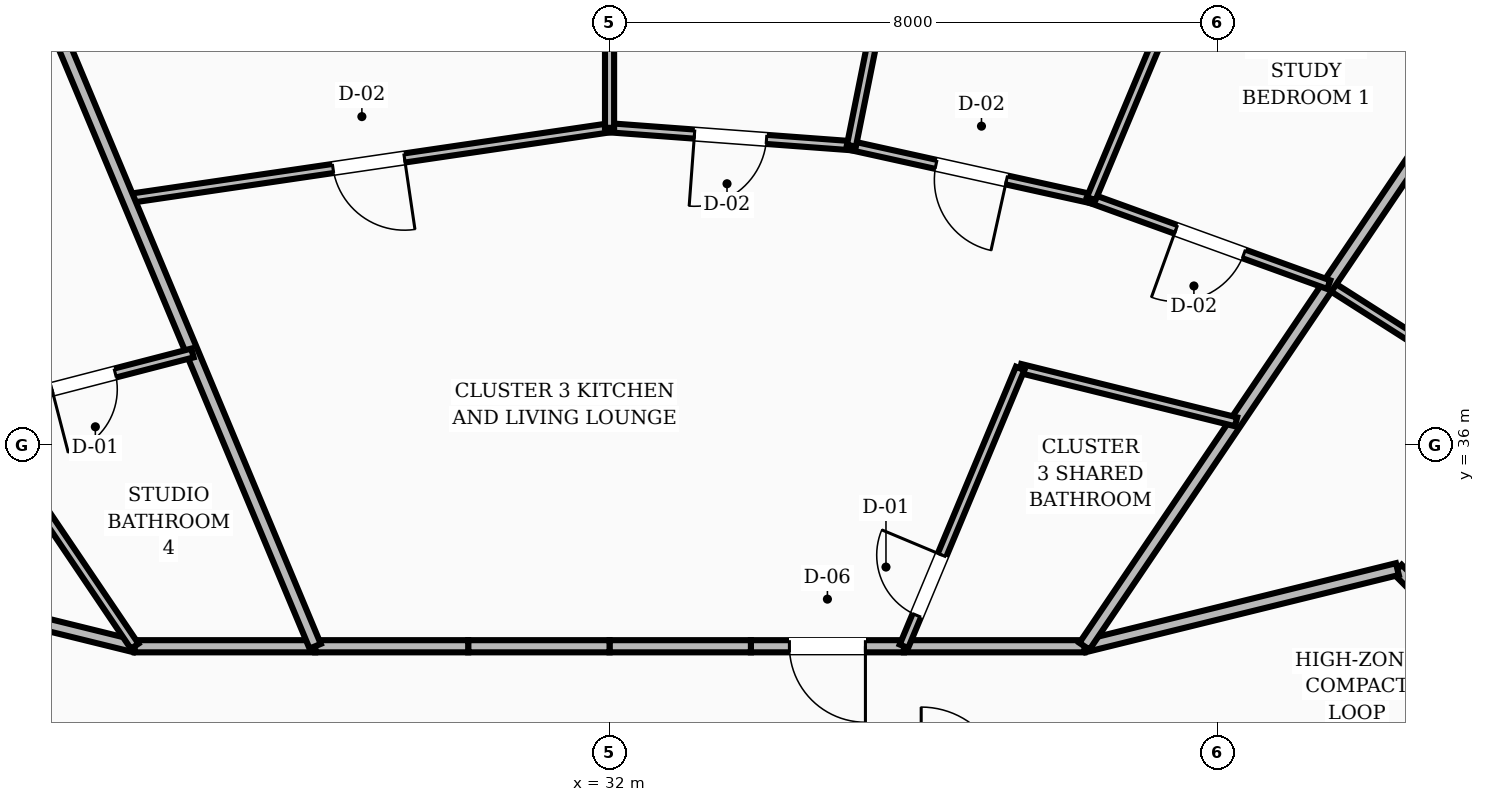
"""IFC4 building model, lengths in metres.
Left out: names, types, materials, properties, quantities, classifications, styles, units other than length and angle.
Written with IfcOpenShell. Run it as: python <this file> out.ifc"""

import sys

from ifc_helpers import new_model, si_unit, direction, frame, frame_2d, origin, place, context, subcontext, project, spatial, rectangle, extrude, element, fill, save


model = new_model("IFC4")
c1 = context("Model", 3, precision=1e-05, world=origin(), true_north=direction((0.0, 1.0)))
c2 = subcontext(c1, "Body", "Model", "MODEL_VIEW")
j1 = project(units=[si_unit("LENGTHUNIT", "METRE"), si_unit("PLANEANGLEUNIT", "RADIAN")], contexts=[c1])
p1 = place(None, origin())
s1 = spatial("IfcSite", under=j1, at=p1, CompositionType="ELEMENT")
p2 = place(p1, origin())
s2 = spatial("IfcBuilding", under=s1, at=p2, CompositionType="ELEMENT")
p3 = place(p2, frame((0.0, 0.0, 247.2)))
s3 = spatial("IfcBuildingStorey", under=s2, at=p3, CompositionType="ELEMENT", Elevation=247.2)
p4 = place(p3, frame((44.427, 32.303, 0.0), z_axis=(0.0, 0.0, 1.0), x_axis=(-0.707106781187, 0.707106781187, 0.0)))
e1 = element("IfcWall", 1, at=p4, inside=s3, PredefinedType="SOLIDWALL", context=c2, shape_type="SweptSolid", body=[
    extrude(rectangle(XDim=2.916, YDim=0.16, at=frame_2d((1.458, 0.0))), origin(), (0.0, 0.0, 1.0), 2.87),
])
p5 = place(p3, frame((42.365, 34.365, 0.0), z_axis=(0.0, 0.0, 1.0), x_axis=(-0.970939799552, -0.239323850978, 0.0)))
e2 = element("IfcWall", 2, at=p5, inside=s3, PredefinedType="SOLIDWALL", context=c2, shape_type="SweptSolid", body=[
    extrude(rectangle(XDim=4.241, YDim=0.16, at=frame_2d((2.12, 0.0))), origin(), (0.0, 0.0, 1.0), 2.87),
])
p6 = place(p3, frame((38.248, 33.35, 0.0), z_axis=(0.0, 0.0, 1.0), x_axis=(-1.0, 0.0, 0.0)))
e3 = element("IfcWall", 3, at=p6, inside=s3, PredefinedType="SOLIDWALL", context=c2, shape_type="SweptSolid", body=[
    extrude(rectangle(XDim=2.375, YDim=0.16, at=frame_2d((1.188, 0.0))), origin(), (0.0, 0.0, 1.0), 2.87),
])
p7 = place(p3, frame((35.873, 33.35, 0.0), z_axis=(0.0, 0.0, 1.0), x_axis=(-1.0, 0.0, 0.0)))
e4 = element("IfcWall", 4, at=p7, inside=s3, PredefinedType="SOLIDWALL", context=c2, shape_type="SweptSolid", body=[
    extrude(rectangle(XDim=2.013, YDim=0.16, at=frame_2d((1.006, 0.0))), origin(), (0.0, 0.0, 1.0), 2.87),
])
p8 = place(p7, frame((0.507, 0.0, 0.0)))
e5 = element("IfcOpeningElement", 5, at=p8, cuts=e4, PredefinedType="OPENING", context=c2, shape_type="SweptSolid", body=[
    extrude(rectangle(XDim=1.0, YDim=2.1, at=frame_2d((0.5, 1.05))), frame((0.0, 0.09, 0.0), z_axis=(0.0, -1.0, 0.0), x_axis=(1.0, 0.0, 0.0)), (0.0, 0.0, 1.0), 0.18),
])
for number, where, z_axis, x_axis in (
    (6, (33.86, 33.35, 0.0), (0.0, 0.0, 1.0), (-1.0, 0.0, 0.0)),
    (7, (32.0, 33.35, 0.0), (0.0, 0.0, 1.0), (-1.0, 0.0, 0.0)),
):
    element("IfcWall", number, at=place(p3, frame(where, z_axis=z_axis, x_axis=x_axis)), inside=s3, PredefinedType="SOLIDWALL", context=c2, shape_type="SweptSolid", body=[
        extrude(rectangle(XDim=1.86, YDim=0.16, at=frame_2d((0.93, 0.0))), origin(), (0.0, 0.0, 1.0), 2.87),
    ])
p9 = place(p3, frame((30.14, 33.35, 0.0), z_axis=(0.0, 0.0, 1.0), x_axis=(-1.0, 0.0, 0.0)))
e8 = element("IfcWall", 8, at=p9, inside=s3, PredefinedType="SOLIDWALL", context=c2, shape_type="SweptSolid", body=[
    extrude(rectangle(XDim=2.013, YDim=0.16, at=frame_2d((1.006, 0.0))), origin(), (0.0, 0.0, 1.0), 2.87),
])
p10 = place(p3, frame((28.127, 33.35, 0.0), z_axis=(0.0, 0.0, 1.0), x_axis=(-1.0, 0.0, 0.0)))
e9 = element("IfcWall", 9, at=p10, inside=s3, PredefinedType="SOLIDWALL", context=c2, shape_type="SweptSolid", body=[
    extrude(rectangle(XDim=2.375, YDim=0.16, at=frame_2d((1.188, 0.0))), origin(), (0.0, 0.0, 1.0), 2.87),
])
p11 = place(p3, frame((25.752, 33.35, 0.0), z_axis=(0.0, 0.0, 1.0), x_axis=(-0.970939799552, 0.239323850978, 0.0)))
e10 = element("IfcWall", 10, at=p11, inside=s3, PredefinedType="SOLIDWALL", context=c2, shape_type="SweptSolid", body=[
    extrude(rectangle(XDim=4.241, YDim=0.16, at=frame_2d((2.12, 0.0))), origin(), (0.0, 0.0, 1.0), 2.87),
])
p12 = place(p11, frame((1.646, 0.0, 0.0)))
e11 = element("IfcOpeningElement", 11, at=p12, cuts=e10, PredefinedType="OPENING", context=c2, shape_type="SweptSolid", body=[
    extrude(rectangle(XDim=0.95, YDim=2.1, at=frame_2d((0.475, 1.05))), frame((0.0, 0.09, 0.0), z_axis=(0.0, -1.0, 0.0), x_axis=(1.0, 0.0, 0.0)), (0.0, 0.0, 1.0), 0.18),
])
p13 = place(p3, frame((47.452, 34.29, 0.0), z_axis=(0.0, 0.0, 1.0), x_axis=(-0.84332026634, 0.53741132141, 0.0)))
e12 = element("IfcWall", 12, at=p13, inside=s3, PredefinedType="PARTITIONING", context=c2, shape_type="SweptSolid", body=[
    extrude(rectangle(XDim=7.104, YDim=0.12, at=frame_2d((3.552, 0.0))), origin(), (0.0, 0.0, 1.0), 2.87),
])
p14 = place(p13, frame((3.077, 0.0, 0.0)))
e13 = element("IfcOpeningElement", 13, at=p14, cuts=e12, PredefinedType="OPENING", context=c2, shape_type="SweptSolid", body=[
    extrude(rectangle(XDim=0.95, YDim=2.1, at=frame_2d((0.475, 1.05))), frame((0.0, 0.07, 0.0), z_axis=(0.0, -1.0, 0.0), x_axis=(1.0, 0.0, 0.0)), (0.0, 0.0, 1.0), 0.14),
])
p15 = place(p3, frame((38.248, 33.35, 0.0), z_axis=(0.0, 0.0, 1.0), x_axis=(0.559821071882, 0.828613521177, 0.0)))
e14 = element("IfcWall", 14, at=p15, inside=s3, PredefinedType="SOLIDWALL", context=c2, shape_type="SweptSolid", body=[
    extrude(rectangle(XDim=9.849, YDim=0.16, at=frame_2d((4.924, 0.0))), origin(), (0.0, 0.0, 1.0), 2.87),
])
p16 = place(p3, frame((40.242, 36.303, 0.0), z_axis=(0.0, 0.0, 1.0), x_axis=(-0.970777237008, 0.239982407911, 0.0)))
e15 = element("IfcWall", 15, at=p16, inside=s3, PredefinedType="PARTITIONING", context=c2, shape_type="SweptSolid", body=[
    extrude(rectangle(XDim=2.926, YDim=0.12, at=frame_2d((1.463, 0.0))), origin(), (0.0, 0.0, 1.0), 2.87),
])
p17 = place(p3, frame((35.873, 33.35, 0.0), z_axis=(0.0, 0.0, 1.0), x_axis=(0.386006387389, 0.922496107794, 0.0)))
e16 = element("IfcWall", 16, at=p17, inside=s3, PredefinedType="PARTITIONING", context=c2, shape_type="SweptSolid", body=[
    extrude(rectangle(XDim=3.962, YDim=0.12, at=frame_2d((1.981, 0.0))), origin(), (0.0, 0.0, 1.0), 2.87),
])
p18 = place(p17, frame((0.44, 0.0, 0.0)))
e17 = element("IfcOpeningElement", 17, at=p18, cuts=e16, PredefinedType="OPENING", context=c2, shape_type="SweptSolid", body=[
    extrude(rectangle(XDim=0.86, YDim=2.1, at=frame_2d((0.43, 1.05))), frame((0.0, 0.07, 0.0), z_axis=(0.0, -1.0, 0.0), x_axis=(1.0, 0.0, 0.0)), (0.0, 0.0, 1.0), 0.14),
])
p19 = place(p3, frame((41.462, 38.107, 0.0), z_axis=(0.0, 0.0, 1.0), x_axis=(-0.940285712811, 0.340386219293, 0.0)))
e18 = element("IfcWall", 18, at=p19, inside=s3, PredefinedType="PARTITIONING", context=c2, shape_type="SweptSolid", body=[
    extrude(rectangle(XDim=3.324, YDim=0.12, at=frame_2d((1.662, 0.0))), origin(), (0.0, 0.0, 1.0), 2.87),
])
p20 = place(p19, frame((1.187, 0.0, 0.0)))
e19 = element("IfcOpeningElement", 19, at=p20, cuts=e18, PredefinedType="OPENING", context=c2, shape_type="SweptSolid", body=[
    extrude(rectangle(XDim=0.95, YDim=2.1, at=frame_2d((0.475, 1.05))), frame((0.0, 0.07, 0.0), z_axis=(0.0, -1.0, 0.0), x_axis=(1.0, 0.0, 0.0)), (0.0, 0.0, 1.0), 0.14),
])
p21 = place(p3, frame((38.336, 39.239, 0.0), z_axis=(0.0, 0.0, 1.0), x_axis=(-0.976460139278, 0.215697928599, 0.0)))
e20 = element("IfcWall", 20, at=p21, inside=s3, PredefinedType="PARTITIONING", context=c2, shape_type="SweptSolid", body=[
    extrude(rectangle(XDim=3.23, YDim=0.12, at=frame_2d((1.615, 0.0))), origin(), (0.0, 0.0, 1.0), 2.87),
])
p22 = place(p21, frame((1.14, 0.0, 0.0)))
e21 = element("IfcOpeningElement", 21, at=p22, cuts=e20, PredefinedType="OPENING", context=c2, shape_type="SweptSolid", body=[
    extrude(rectangle(XDim=0.95, YDim=2.1, at=frame_2d((0.475, 1.05))), frame((0.0, 0.07, 0.0), z_axis=(0.0, -1.0, 0.0), x_axis=(1.0, 0.0, 0.0)), (0.0, 0.0, 1.0), 0.14),
])
p23 = place(p3, frame((38.336, 39.239, 0.0), z_axis=(0.0, 0.0, 1.0), x_axis=(0.385972204877, 0.922510410273, 0.0)))
e22 = element("IfcWall", 22, at=p23, inside=s3, PredefinedType="PARTITIONING", context=c2, shape_type="SweptSolid", body=[
    extrude(rectangle(XDim=4.573, YDim=0.12, at=frame_2d((2.286, 0.0))), origin(), (0.0, 0.0, 1.0), 2.87),
])
p24 = place(p3, frame((35.182, 39.935, 0.0), z_axis=(0.0, 0.0, 1.0), x_axis=(-0.997276098801, 0.073758950379, 0.0)))
e23 = element("IfcWall", 23, at=p24, inside=s3, PredefinedType="PARTITIONING", context=c2, shape_type="SweptSolid", body=[
    extrude(rectangle(XDim=3.191, YDim=0.12, at=frame_2d((1.595, 0.0))), origin(), (0.0, 0.0, 1.0), 2.87),
])
p25 = place(p24, frame((1.12, 0.0, 0.0)))
e24 = element("IfcOpeningElement", 24, at=p25, cuts=e23, PredefinedType="OPENING", context=c2, shape_type="SweptSolid", body=[
    extrude(rectangle(XDim=0.95, YDim=2.1, at=frame_2d((0.475, 1.05))), frame((0.0, 0.07, 0.0), z_axis=(0.0, -1.0, 0.0), x_axis=(1.0, 0.0, 0.0)), (0.0, 0.0, 1.0), 0.14),
])
p26 = place(p3, frame((35.182, 39.935, 0.0), z_axis=(0.0, 0.0, 1.0), x_axis=(0.196876805664, 0.980428234697, 0.0)))
e25 = element("IfcWall", 25, at=p26, inside=s3, PredefinedType="PARTITIONING", context=c2, shape_type="SweptSolid", body=[
    extrude(rectangle(XDim=4.814, YDim=0.12, at=frame_2d((2.407, 0.0))), origin(), (0.0, 0.0, 1.0), 2.87),
])
p27 = place(p3, frame((32.0, 40.171, 0.0), z_axis=(0.0, 0.0, 1.0), x_axis=(-0.989352356065, -0.145540082278, 0.0)))
e26 = element("IfcWall", 26, at=p27, inside=s3, PredefinedType="PARTITIONING", context=c2, shape_type="SweptSolid", body=[
    extrude(rectangle(XDim=6.405, YDim=0.12, at=frame_2d((3.202, 0.0))), origin(), (0.0, 0.0, 1.0), 2.87),
])
p28 = place(p27, frame((2.727, 0.0, 0.0)))
e27 = element("IfcOpeningElement", 27, at=p28, cuts=e26, PredefinedType="OPENING", context=c2, shape_type="SweptSolid", body=[
    extrude(rectangle(XDim=0.95, YDim=2.1, at=frame_2d((0.475, 1.05))), frame((0.0, 0.07, 0.0), z_axis=(0.0, -1.0, 0.0), x_axis=(1.0, 0.0, 0.0)), (0.0, 0.0, 1.0), 0.14),
])
p29 = place(p3, frame((32.0, 40.171, 0.0), z_axis=(0.0, 0.0, 1.0), x_axis=(0.0, 1.0, 0.0)))
e28 = element("IfcWall", 28, at=p29, inside=s3, PredefinedType="PARTITIONING", context=c2, shape_type="SweptSolid", body=[
    extrude(rectangle(XDim=4.889, YDim=0.12, at=frame_2d((2.445, 0.0))), origin(), (0.0, 0.0, 1.0), 2.87),
])
p30 = place(p3, frame((28.127, 33.35, 0.0), z_axis=(0.0, 0.0, 1.0), x_axis=(-0.385967865978, 0.922512225628, 0.0)))
e29 = element("IfcWall", 29, at=p30, inside=s3, PredefinedType="SOLIDWALL", context=c2, shape_type="SweptSolid", body=[
    extrude(rectangle(XDim=10.956, YDim=0.16, at=frame_2d((5.478, 0.0))), origin(), (0.0, 0.0, 1.0), 2.87),
])
p31 = place(p3, frame((26.513, 37.208, 0.0), z_axis=(0.0, 0.0, 1.0), x_axis=(-0.968151047418, -0.250366829639, 0.0)))
e30 = element("IfcWall", 30, at=p31, inside=s3, PredefinedType="PARTITIONING", context=c2, shape_type="SweptSolid", body=[
    extrude(rectangle(XDim=2.96, YDim=0.12, at=frame_2d((1.48, 0.0))), origin(), (0.0, 0.0, 1.0), 2.87),
])
p32 = place(p31, frame((1.05, 0.0, 0.0)))
e31 = element("IfcOpeningElement", 31, at=p32, cuts=e30, PredefinedType="OPENING", context=c2, shape_type="SweptSolid", body=[
    extrude(rectangle(XDim=0.86, YDim=2.1, at=frame_2d((0.43, 1.05))), frame((0.0, 0.07, 0.0), z_axis=(0.0, -1.0, 0.0), x_axis=(1.0, 0.0, 0.0)), (0.0, 0.0, 1.0), 0.14),
])
p33 = place(p3, frame((25.752, 33.35, 0.0), z_axis=(0.0, 0.0, 1.0), x_axis=(-0.559827300853, 0.828609312776, 0.0)))
e32 = element("IfcWall", 32, at=p33, inside=s3, PredefinedType="PARTITIONING", context=c2, shape_type="SweptSolid", body=[
    extrude(rectangle(XDim=3.761, YDim=0.12, at=frame_2d((1.881, 0.0))), origin(), (0.0, 0.0, 1.0), 2.87),
])
p34 = place(p18, origin())
e33 = element("IfcDoor", 33, at=p34, inside=s3, OperationType="SINGLE_SWING_RIGHT", PredefinedType="DOOR", context=c2, shape_type="SweptSolid", body=[
    extrude(rectangle(XDim=0.86, YDim=2.1, at=frame_2d((0.43, 1.05))), frame((0.0, 0.025, 0.0), z_axis=(0.0, -1.0, 0.0), x_axis=(1.0, 0.0, 0.0)), (0.0, 0.0, 1.0), 0.05),
])
fill(e17, e33)
p35 = place(p8, origin())
e34 = element("IfcDoor", 34, at=p35, inside=s3, OperationType="SINGLE_SWING_LEFT", PredefinedType="DOOR", context=c2, shape_type="SweptSolid", body=[
    extrude(rectangle(XDim=1.0, YDim=2.1, at=frame_2d((0.5, 1.05))), frame((0.0, 0.025, 0.0), z_axis=(0.0, -1.0, 0.0), x_axis=(1.0, 0.0, 0.0)), (0.0, 0.0, 1.0), 0.05),
])
fill(e5, e34)
p36 = place(p20, origin())
e35 = element("IfcDoor", 35, at=p36, inside=s3, OperationType="SINGLE_SWING_RIGHT", PredefinedType="DOOR", context=c2, shape_type="SweptSolid", body=[
    extrude(rectangle(XDim=0.95, YDim=2.1, at=frame_2d((0.475, 1.05))), frame((0.0, 0.025, 0.0), z_axis=(0.0, -1.0, 0.0), x_axis=(1.0, 0.0, 0.0)), (0.0, 0.0, 1.0), 0.05),
])
fill(e19, e35)
p37 = place(p22, origin())
e36 = element("IfcDoor", 36, at=p37, inside=s3, OperationType="SINGLE_SWING_LEFT", PredefinedType="DOOR", context=c2, shape_type="SweptSolid", body=[
    extrude(rectangle(XDim=0.95, YDim=2.1, at=frame_2d((0.475, 1.05))), frame((0.0, 0.025, 0.0), z_axis=(0.0, -1.0, 0.0), x_axis=(1.0, 0.0, 0.0)), (0.0, 0.0, 1.0), 0.05),
])
fill(e21, e36)
p38 = place(p25, origin())
e37 = element("IfcDoor", 37, at=p38, inside=s3, OperationType="SINGLE_SWING_RIGHT", PredefinedType="DOOR", context=c2, shape_type="SweptSolid", body=[
    extrude(rectangle(XDim=0.95, YDim=2.1, at=frame_2d((0.475, 1.05))), frame((0.0, 0.025, 0.0), z_axis=(0.0, -1.0, 0.0), x_axis=(1.0, 0.0, 0.0)), (0.0, 0.0, 1.0), 0.05),
])
fill(e24, e37)
p39 = place(p28, origin())
e38 = element("IfcDoor", 38, at=p39, inside=s3, OperationType="SINGLE_SWING_LEFT", PredefinedType="DOOR", context=c2, shape_type="SweptSolid", body=[
    extrude(rectangle(XDim=0.95, YDim=2.1, at=frame_2d((0.475, 1.05))), frame((0.0, 0.025, 0.0), z_axis=(0.0, -1.0, 0.0), x_axis=(1.0, 0.0, 0.0)), (0.0, 0.0, 1.0), 0.05),
])
fill(e27, e38)
p40 = place(p32, origin())
e39 = element("IfcDoor", 39, at=p40, inside=s3, OperationType="SINGLE_SWING_RIGHT", PredefinedType="DOOR", context=c2, shape_type="SweptSolid", body=[
    extrude(rectangle(XDim=0.86, YDim=2.1, at=frame_2d((0.43, 1.05))), frame((0.0, 0.025, 0.0), z_axis=(0.0, -1.0, 0.0), x_axis=(1.0, 0.0, 0.0)), (0.0, 0.0, 1.0), 0.05),
])
fill(e31, e39)
save(model, sys.argv[1])
